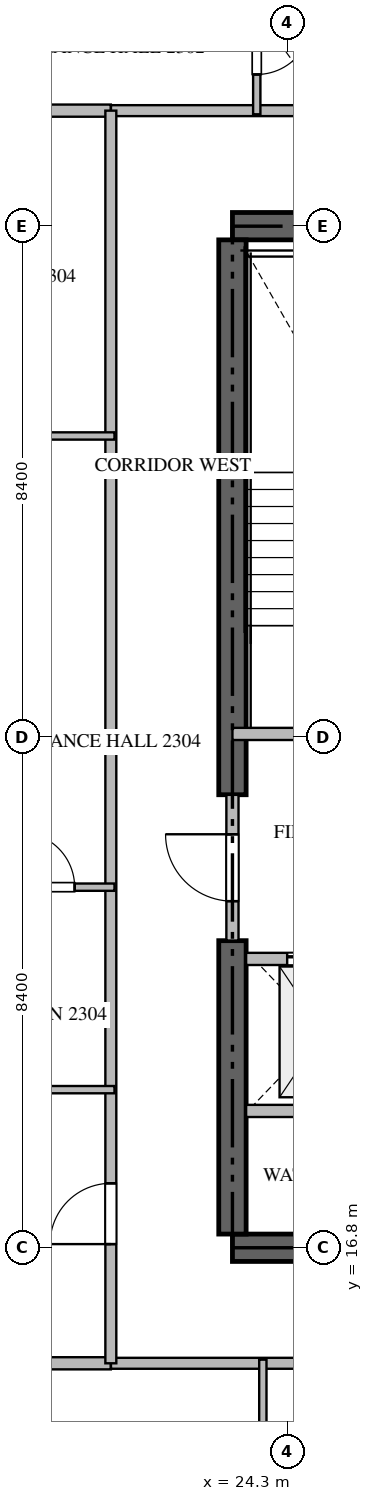
"""IFC4 building model, lengths in metres.
Left out: names, types, materials, properties, quantities, classifications, styles, units other than length and angle.
Written with IfcOpenShell. Run it as: python <this file> out.ifc"""

import sys

from ifc_helpers import new_model, si_unit, direction, frame, frame_2d, origin, place, context, subcontext, project, spatial, rectangle, extrude, source, transform, mapped, element, fill, save


model = new_model("IFC4")
c1 = context("Model", 3, precision=1e-05, world=origin(), true_north=direction((0.0, 1.0)))
c2 = subcontext(c1, "Body", "Model", "MODEL_VIEW")
j1 = project(units=[si_unit("LENGTHUNIT", "METRE"), si_unit("PLANEANGLEUNIT", "RADIAN")], contexts=[c1])
p1 = place(None, origin())
s1 = spatial("IfcSite", under=j1, at=p1, CompositionType="ELEMENT")
p2 = place(p1, origin())
s2 = spatial("IfcBuilding", under=s1, at=p2, CompositionType="ELEMENT")
p3 = place(p2, frame((0.0, 0.0, 94.2)))
s3 = spatial("IfcBuildingStorey", under=s2, at=p3, CompositionType="ELEMENT", Elevation=94.2)
for number, where, z_axis, x_axis in (
    (1, (23.4, 16.8, -0.26), (0.0, 0.0, 1.0), (1.0, 0.0, 0.0)),
    (2, (41.4, 33.6, -0.26), (0.0, 0.0, 1.0), (-1.0, 0.0, 0.0)),
):
    element("IfcWall", number, at=place(p3, frame(where, z_axis=z_axis, x_axis=x_axis)), inside=s3, PredefinedType="SHEAR", context=c2, shape_type="SweptSolid", body=[
        extrude(rectangle(XDim=18.0, YDim=0.45, at=frame_2d((9.0, 0.0))), origin(), (0.0, 0.0, 1.0), 3.748),
    ])
p4 = place(p3, frame((23.4, 17.025, -0.26), z_axis=(0.0, 0.0, 1.0), x_axis=(0.0, 1.0, 0.0)))
e3 = element("IfcWall", 3, at=p4, inside=s3, PredefinedType="SHEAR", context=c2, shape_type="SweptSolid", body=[
    extrude(rectangle(XDim=4.825, YDim=0.45, at=frame_2d((2.413, 0.0))), origin(), (0.0, 0.0, 1.0), 3.748),
])
p5 = place(p3, frame((23.4, 24.25, -0.26), z_axis=(0.0, 0.0, 1.0), x_axis=(0.0, 1.0, 0.0)))
e4 = element("IfcWall", 4, at=p5, inside=s3, PredefinedType="SHEAR", context=c2, shape_type="SweptSolid", body=[
    extrude(rectangle(XDim=9.125, YDim=0.45, at=frame_2d((4.562, 0.0))), origin(), (0.0, 0.0, 1.0), 3.748),
])
p6 = place(p3, frame((23.4, 25.25, 0.0), z_axis=(0.0, 0.0, 1.0), x_axis=(1.0, 0.0, 0.0)))
e5 = element("IfcWall", 5, at=p6, inside=s3, PredefinedType="STANDARD", context=c2, shape_type="SweptSolid", body=[
    extrude(rectangle(XDim=4.45, YDim=0.2, at=frame_2d((2.225, 0.0))), origin(), (0.0, 0.0, 1.0), 3.49),
])
p7 = place(p6, frame((1.65, 0.0, 0.0)))
e6 = element("IfcOpeningElement", 6, at=p7, cuts=e5, PredefinedType="OPENING", context=c2, shape_type="SweptSolid", body=[
    extrude(rectangle(XDim=1.1, YDim=2.15, at=frame_2d((0.55, 1.075))), frame((0.0, 0.11, 0.0), z_axis=(0.0, -1.0, 0.0), x_axis=(1.0, 0.0, 0.0)), (0.0, 0.0, 1.0), 0.22),
])
p8 = place(p3, frame((23.625, 21.55, 0.0), z_axis=(0.0, 0.0, 1.0), x_axis=(1.0, 0.0, 0.0)))
e7 = element("IfcWall", 7, at=p8, inside=s3, PredefinedType="STANDARD", context=c2, shape_type="SweptSolid", body=[
    extrude(rectangle(XDim=2.425, YDim=0.2, at=frame_2d((1.212, 0.0))), origin(), (0.0, 0.0, 1.0), 3.49),
])
p9 = place(p8, frame((0.675, 0.0, 0.0)))
e8 = element("IfcOpeningElement", 8, at=p9, cuts=e7, PredefinedType="OPENING", context=c2, shape_type="SweptSolid", body=[
    extrude(rectangle(XDim=1.2, YDim=2.2, at=frame_2d((0.6, 1.1))), frame((0.0, 0.11, 0.0), z_axis=(0.0, -1.0, 0.0), x_axis=(1.0, 0.0, 0.0)), (0.0, 0.0, 1.0), 0.22),
])
p10 = place(p3, frame((23.625, 19.05, 0.0), z_axis=(0.0, 0.0, 1.0), x_axis=(1.0, 0.0, 0.0)))
e9 = element("IfcWall", 9, at=p10, inside=s3, PredefinedType="STANDARD", context=c2, shape_type="SweptSolid", body=[
    extrude(rectangle(XDim=2.425, YDim=0.2, at=frame_2d((1.212, 0.0))), origin(), (0.0, 0.0, 1.0), 3.49),
])
p11 = place(p3, frame((23.4, 21.852, 0.0), z_axis=(0.0, 0.0, 1.0), x_axis=(0.0, 1.0, 0.0)))
e10 = element("IfcWall", 10, at=p11, inside=s3, PredefinedType="STANDARD", context=c2, shape_type="SweptSolid", body=[
    extrude(rectangle(XDim=2.396, YDim=0.2, at=frame_2d((1.198, 0.0))), origin(), (0.0, 0.0, 1.0), 3.49),
])
p12 = place(p11, frame((0.648, 0.0, 0.0)))
e11 = element("IfcOpeningElement", 11, at=p12, cuts=e10, PredefinedType="OPENING", context=c2, shape_type="SweptSolid", body=[
    extrude(rectangle(XDim=1.1, YDim=2.15, at=frame_2d((0.55, 1.075))), frame((0.0, 0.11, 0.0), z_axis=(0.0, -1.0, 0.0), x_axis=(1.0, 0.0, 0.0)), (0.0, 0.0, 1.0), 0.22),
])
for number, where, z_axis, x_axis in (
    (12, (6.082, 14.9, 0.0), (0.0, 0.0, 1.0), (1.0, 0.0, 0.0)),
    (13, (6.082, 35.5, 0.0), (0.0, 0.0, 1.0), (1.0, 0.0, 0.0)),
):
    element("IfcWall", number, at=place(p3, frame(where, z_axis=z_axis, x_axis=x_axis)), inside=s3, PredefinedType="PARTITIONING", context=c2, shape_type="SweptSolid", body=[
        extrude(rectangle(XDim=15.318, YDim=0.2, at=frame_2d((7.659, 0.0))), origin(), (0.0, 0.0, 1.0), 3.49),
    ])
p13 = place(p3, frame((21.402, 14.9, 0.0), z_axis=(0.0, 0.0, 1.0), x_axis=(1.0, 0.0, 0.0)))
e14 = element("IfcWall", 14, at=p13, inside=s3, PredefinedType="PARTITIONING", context=c2, shape_type="SweptSolid", body=[
    extrude(rectangle(XDim=21.996, YDim=0.18, at=frame_2d((10.998, 0.0))), origin(), (0.0, 0.0, 1.0), 3.49),
])
p14 = place(p13, frame((15.222, 0.0, 0.0)))
e15 = element("IfcOpeningElement", 15, at=p14, cuts=e14, PredefinedType="OPENING", context=c2, shape_type="SweptSolid", body=[
    extrude(rectangle(XDim=1.0, YDim=2.15, at=frame_2d((0.5, 1.075))), frame((0.0, 0.1, 0.0), z_axis=(0.0, -1.0, 0.0), x_axis=(1.0, 0.0, 0.0)), (0.0, 0.0, 1.0), 0.2),
])
p15 = place(p3, frame((21.402, 35.5, 0.0), z_axis=(0.0, 0.0, 1.0), x_axis=(1.0, 0.0, 0.0)))
e16 = element("IfcWall", 16, at=p15, inside=s3, PredefinedType="PARTITIONING", context=c2, shape_type="SweptSolid", body=[
    extrude(rectangle(XDim=21.996, YDim=0.18, at=frame_2d((10.998, 0.0))), origin(), (0.0, 0.0, 1.0), 3.49),
])
p16 = place(p15, frame((7.454, 0.0, 0.0)))
e17 = element("IfcOpeningElement", 17, at=p16, cuts=e16, PredefinedType="OPENING", context=c2, shape_type="SweptSolid", body=[
    extrude(rectangle(XDim=1.0, YDim=2.15, at=frame_2d((0.5, 1.075))), frame((0.0, 0.1, 0.0), z_axis=(0.0, -1.0, 0.0), x_axis=(1.0, 0.0, 0.0)), (0.0, 0.0, 1.0), 0.2),
])
p17 = place(p15, frame((13.542, 0.0, 0.0)))
e18 = element("IfcOpeningElement", 18, at=p17, cuts=e16, PredefinedType="OPENING", context=c2, shape_type="SweptSolid", body=[
    extrude(rectangle(XDim=1.0, YDim=2.15, at=frame_2d((0.5, 1.075))), frame((0.0, 0.1, 0.0), z_axis=(0.0, -1.0, 0.0), x_axis=(1.0, 0.0, 0.0)), (0.0, 0.0, 1.0), 0.2),
])
p18 = place(p3, frame((21.4, 14.9, 0.0), z_axis=(0.0, 0.0, 1.0), x_axis=(0.0, 1.0, 0.0)))
e19 = element("IfcWall", 19, at=p18, inside=s3, PredefinedType="PARTITIONING", context=c2, shape_type="SweptSolid", body=[
    extrude(rectangle(XDim=20.6, YDim=0.18, at=frame_2d((10.3, 0.0))), origin(), (0.0, 0.0, 1.0), 3.49),
])
p19 = place(p18, frame((1.96, 0.0, 0.0)))
e20 = element("IfcOpeningElement", 20, at=p19, cuts=e19, PredefinedType="OPENING", context=c2, shape_type="SweptSolid", body=[
    extrude(rectangle(XDim=1.0, YDim=2.15, at=frame_2d((0.5, 1.075))), frame((0.0, 0.1, 0.0), z_axis=(0.0, -1.0, 0.0), x_axis=(1.0, 0.0, 0.0)), (0.0, 0.0, 1.0), 0.2),
])
p20 = place(p3, frame((23.9, 12.752, 0.0), z_axis=(0.0, 0.0, 1.0), x_axis=(0.0, 1.0, 0.0)))
e21 = element("IfcWall", 21, at=p20, inside=s3, PredefinedType="PARTITIONING", context=c2, shape_type="SweptSolid", body=[
    extrude(rectangle(XDim=2.208, YDim=0.12, at=frame_2d((1.104, 0.0))), origin(), (0.0, 0.0, 1.0), 3.49),
])
p21 = place(p3, frame((23.8, 37.65, 0.0), z_axis=(0.0, 0.0, 1.0), x_axis=(0.0, -1.0, 0.0)))
e22 = element("IfcWall", 22, at=p21, inside=s3, PredefinedType="PARTITIONING", context=c2, shape_type="SweptSolid", body=[
    extrude(rectangle(XDim=2.21, YDim=0.12, at=frame_2d((1.105, 0.0))), origin(), (0.0, 0.0, 1.0), 3.49),
])
p22 = place(p21, frame((0.655, 0.0, 0.0)))
e23 = element("IfcOpeningElement", 23, at=p22, cuts=e22, PredefinedType="OPENING", context=c2, shape_type="SweptSolid", body=[
    extrude(rectangle(XDim=0.9, YDim=2.1, at=frame_2d((0.45, 1.05))), frame((0.0, 0.07, 0.0), z_axis=(0.0, -1.0, 0.0), x_axis=(1.0, 0.0, 0.0)), (0.0, 0.0, 1.0), 0.14),
])
p23 = place(p3, frame((18.65, 19.4, 0.0), z_axis=(0.0, 0.0, 1.0), x_axis=(1.0, 0.0, 0.0)))
e24 = element("IfcWall", 24, at=p23, inside=s3, PredefinedType="PARTITIONING", context=c2, shape_type="SweptSolid", body=[
    extrude(rectangle(XDim=2.81, YDim=0.12, at=frame_2d((1.405, 0.0))), origin(), (0.0, 0.0, 1.0), 3.49),
])
p24 = place(p3, frame((19.25, 22.73, 0.0), z_axis=(0.0, 0.0, 1.0), x_axis=(1.0, 0.0, 0.0)))
e25 = element("IfcWall", 25, at=p24, inside=s3, PredefinedType="PARTITIONING", context=c2, shape_type="SweptSolid", body=[
    extrude(rectangle(XDim=2.21, YDim=0.12, at=frame_2d((1.105, 0.0))), origin(), (0.0, 0.0, 1.0), 3.49),
])
p25 = place(p24, frame((0.655, 0.0, 0.0)))
e26 = element("IfcOpeningElement", 26, at=p25, cuts=e25, PredefinedType="OPENING", context=c2, shape_type="SweptSolid", body=[
    extrude(rectangle(XDim=0.9, YDim=2.1, at=frame_2d((0.45, 1.05))), frame((0.0, 0.07, 0.0), z_axis=(0.0, -1.0, 0.0), x_axis=(1.0, 0.0, 0.0)), (0.0, 0.0, 1.0), 0.14),
])
p26 = place(p3, frame((19.252, 30.15, 0.0), z_axis=(0.0, 0.0, 1.0), x_axis=(1.0, 0.0, 0.0)))
e27 = element("IfcWall", 27, at=p26, inside=s3, PredefinedType="PARTITIONING", context=c2, shape_type="SweptSolid", body=[
    extrude(rectangle(XDim=2.208, YDim=0.12, at=frame_2d((1.104, 0.0))), origin(), (0.0, 0.0, 1.0), 3.49),
])
m1 = source(origin(), c2, "Body", "SweptSolid", [
    extrude(rectangle(XDim=1.2, YDim=2.2, at=frame_2d((0.6, 1.1))), frame((0.0, 0.025, 0.0), z_axis=(0.0, -1.0, 0.0), x_axis=(1.0, 0.0, 0.0)), (0.0, 0.0, 1.0), 0.05),
])
p27 = place(p9, origin())
e28 = element("IfcDoor", 28, at=p27, inside=s3, OperationType="DOUBLE_DOOR_SLIDING", PredefinedType="DOOR", context=c2, shape_type="MappedRepresentation", body=[
    mapped(m1, transform((0.0, 0.0, 0.0), scale=1.0)),
])
fill(e8, e28)
m2 = source(origin(), c2, "Body", "SweptSolid", [
    extrude(rectangle(XDim=1.1, YDim=2.15, at=frame_2d((0.55, 1.075))), frame((0.0, 0.025, 0.0), z_axis=(0.0, -1.0, 0.0), x_axis=(1.0, 0.0, 0.0)), (0.0, 0.0, 1.0), 0.05),
])
p28 = place(p12, origin())
e29 = element("IfcDoor", 29, at=p28, inside=s3, OperationType="SINGLE_SWING_RIGHT", PredefinedType="DOOR", context=c2, shape_type="MappedRepresentation", body=[
    mapped(m2, transform((0.0, 0.0, 0.0), scale=1.0)),
])
fill(e11, e29)
m3 = source(origin(), c2, "Body", "SweptSolid", [
    extrude(rectangle(XDim=1.0, YDim=2.15, at=frame_2d((0.5, 1.075))), frame((0.0, 0.025, 0.0), z_axis=(0.0, -1.0, 0.0), x_axis=(1.0, 0.0, 0.0)), (0.0, 0.0, 1.0), 0.05),
])
p29 = place(p19, origin())
e30 = element("IfcDoor", 30, at=p29, inside=s3, OperationType="SINGLE_SWING_LEFT", PredefinedType="DOOR", context=c2, shape_type="MappedRepresentation", body=[
    mapped(m3, transform((0.0, 0.0, 0.0), scale=1.0)),
])
fill(e20, e30)
m4 = source(origin(), c2, "Body", "SweptSolid", [
    extrude(rectangle(XDim=0.9, YDim=2.1, at=frame_2d((0.45, 1.05))), frame((0.0, 0.025, 0.0), z_axis=(0.0, -1.0, 0.0), x_axis=(1.0, 0.0, 0.0)), (0.0, 0.0, 1.0), 0.05),
])
p30 = place(p22, origin())
e31 = element("IfcDoor", 31, at=p30, inside=s3, OperationType="SINGLE_SWING_LEFT", PredefinedType="DOOR", context=c2, shape_type="MappedRepresentation", body=[
    mapped(m4, transform((0.0, 0.0, 0.0), scale=1.0)),
])
fill(e23, e31)
p31 = place(p25, origin())
e32 = element("IfcDoor", 32, at=p31, inside=s3, OperationType="SINGLE_SWING_LEFT", PredefinedType="DOOR", context=c2, shape_type="MappedRepresentation", body=[
    mapped(m4, transform((0.0, 0.0, 0.0), scale=1.0)),
])
fill(e26, e32)
save(model, sys.argv[1])
